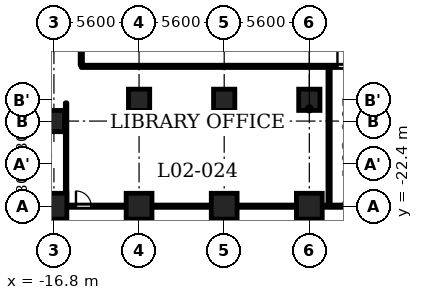
"""IFC4 building model, lengths in metres.
Left out: names, types, materials, properties, quantities, classifications, styles, units other than length and angle.
Written with IfcOpenShell. Run it as: python <this file> out.ifc"""

import sys

from ifc_helpers import new_model, si_unit, direction, frame, frame_2d, origin, origin_2d, place, context, subcontext, project, spatial, rectangle, extrude, element, fill, save


model = new_model("IFC4")
c1 = context("Model", 3, precision=1e-05, world=origin(), true_north=direction((0.0, 1.0)))
c2 = subcontext(c1, "Body", "Model", "MODEL_VIEW")
j1 = project(units=[si_unit("LENGTHUNIT", "METRE"), si_unit("PLANEANGLEUNIT", "RADIAN")], contexts=[c1])
p1 = place(None, origin())
s1 = spatial("IfcSite", under=j1, at=p1, CompositionType="ELEMENT")
p2 = place(p1, origin())
s2 = spatial("IfcBuilding", under=s1, at=p2, CompositionType="ELEMENT")
p3 = place(p2, frame((0.0, 0.0, 11.3)))
s3 = spatial("IfcBuildingStorey", under=s2, at=p3, CompositionType="ELEMENT", Elevation=11.3)
for number, where, z_axis, x_axis in (
    (1, (-16.8, -22.4, 0.0), (0.0, 0.0, 1.0), (1.0, 0.0, 0.0)),
    (2, (-11.2, -22.4, 0.0), (0.0, 0.0, 1.0), (1.0, 0.0, 0.0)),
    (3, (-5.6, -22.4, 0.0), (0.0, 0.0, 1.0), (1.0, 0.0, 0.0)),
    (4, (0.0, -22.4, 0.0), (0.0, 0.0, 1.0), (1.0, 0.0, 0.0)),
):
    element("IfcColumn", number, at=place(p3, frame(where, z_axis=z_axis, x_axis=x_axis)), inside=s3, PredefinedType="COLUMN", context=c2, shape_type="SweptSolid", body=[
        extrude(rectangle(XDim=1.7, YDim=1.7, at=origin_2d()), origin(), (0.0, 0.0, 1.0), 4.8),
    ])
for number, where, z_axis, x_axis in (
    (5, (-16.8, -16.8, 0.0), (0.0, 0.0, 1.0), (1.0, 0.0, 0.0)),
    (6, (-11.2, -15.4, 0.0), (0.0, 0.0, 1.0), (1.0, 0.0, 0.0)),
    (7, (-5.6, -15.4, 0.0), (0.0, 0.0, 1.0), (1.0, 0.0, 0.0)),
    (8, (0.0, -15.4, 0.0), (0.0, 0.0, 1.0), (1.0, 0.0, 0.0)),
):
    element("IfcColumn", number, at=place(p3, frame(where, z_axis=z_axis, x_axis=x_axis)), inside=s3, PredefinedType="COLUMN", context=c2, shape_type="SweptSolid", body=[
        extrude(rectangle(XDim=1.4, YDim=1.4, at=origin_2d()), origin(), (0.0, 0.0, 1.0), 4.8),
    ])
p4 = place(p3, frame((-18.98, -22.4, 0.0), z_axis=(0.0, 0.0, 1.0), x_axis=(1.0, 0.0, 0.0)))
e9 = element("IfcWall", 9, at=p4, inside=s3, PredefinedType="PARTITIONING", context=c2, shape_type="SweptSolid", body=[
    extrude(rectangle(XDim=38.211, YDim=0.15, at=frame_2d((19.105, 0.0))), origin(), (0.0, 0.0, 1.0), 3.55),
])
p5 = place(p4, frame((21.18, 0.0, 0.0)))
e10 = element("IfcOpeningElement", 10, at=p5, cuts=e9, PredefinedType="OPENING", context=c2, shape_type="SweptSolid", body=[
    extrude(rectangle(XDim=1.2, YDim=2.1, at=frame_2d((0.6, 1.05))), frame((0.0, 0.085, 0.0), z_axis=(0.0, -1.0, 0.0), x_axis=(1.0, 0.0, 0.0)), (0.0, 0.0, 1.0), 0.17),
])
p6 = place(p4, frame((0.08, 0.0, 0.0)))
e11 = element("IfcOpeningElement", 11, at=p6, cuts=e9, PredefinedType="OPENING", context=c2, shape_type="SweptSolid", body=[
    extrude(rectangle(XDim=1.0, YDim=2.1, at=frame_2d((0.5, 1.05))), frame((0.0, 0.085, 0.0), z_axis=(0.0, -1.0, 0.0), x_axis=(1.0, 0.0, 0.0)), (0.0, 0.0, 1.0), 0.17),
])
p7 = place(p4, frame((3.63, 0.0, 0.0)))
e12 = element("IfcOpeningElement", 12, at=p7, cuts=e9, PredefinedType="OPENING", context=c2, shape_type="SweptSolid", body=[
    extrude(rectangle(XDim=1.0, YDim=2.1, at=frame_2d((0.5, 1.05))), frame((0.0, 0.085, 0.0), z_axis=(0.0, -1.0, 0.0), x_axis=(1.0, 0.0, 0.0)), (0.0, 0.0, 1.0), 0.17),
])
p8 = place(p4, frame((27.93, 0.0, 0.0)))
e13 = element("IfcOpeningElement", 13, at=p8, cuts=e9, PredefinedType="OPENING", context=c2, shape_type="SweptSolid", body=[
    extrude(rectangle(XDim=0.9, YDim=2.1, at=frame_2d((0.45, 1.05))), frame((0.0, 0.085, 0.0), z_axis=(0.0, -1.0, 0.0), x_axis=(1.0, 0.0, 0.0)), (0.0, 0.0, 1.0), 0.17),
])
p9 = place(p4, frame((31.18, 0.0, 0.0)))
e14 = element("IfcOpeningElement", 14, at=p9, cuts=e9, PredefinedType="OPENING", context=c2, shape_type="SweptSolid", body=[
    extrude(rectangle(XDim=0.9, YDim=2.1, at=frame_2d((0.45, 1.05))), frame((0.0, 0.085, 0.0), z_axis=(0.0, -1.0, 0.0), x_axis=(1.0, 0.0, 0.0)), (0.0, 0.0, 1.0), 0.17),
])
p10 = place(p4, frame((33.88, 0.0, 0.0)))
e15 = element("IfcOpeningElement", 15, at=p10, cuts=e9, PredefinedType="OPENING", context=c2, shape_type="SweptSolid", body=[
    extrude(rectangle(XDim=0.9, YDim=2.1, at=frame_2d((0.45, 1.05))), frame((0.0, 0.085, 0.0), z_axis=(0.0, -1.0, 0.0), x_axis=(1.0, 0.0, 0.0)), (0.0, 0.0, 1.0), 0.17),
])
p11 = place(p4, frame((37.231, 0.0, 0.0)))
e16 = element("IfcOpeningElement", 16, at=p11, cuts=e9, PredefinedType="OPENING", context=c2, shape_type="SweptSolid", body=[
    extrude(rectangle(XDim=0.9, YDim=2.1, at=frame_2d((0.45, 1.05))), frame((0.0, 0.085, 0.0), z_axis=(0.0, -1.0, 0.0), x_axis=(1.0, 0.0, 0.0)), (0.0, 0.0, 1.0), 0.17),
])
p12 = place(p3, frame((-15.005, -13.2, 0.0), z_axis=(0.0, 0.0, 1.0), x_axis=(1.0, 0.0, 0.0)))
e17 = element("IfcWall", 17, at=p12, inside=s3, PredefinedType="PARTITIONING", context=c2, shape_type="SweptSolid", body=[
    extrude(rectangle(XDim=30.01, YDim=0.15, at=frame_2d((15.005, 0.0))), origin(), (0.0, 0.0, 1.0), 4.45),
])
p13 = place(p12, frame((16.855, 0.0, 0.0)))
e18 = element("IfcOpeningElement", 18, at=p13, cuts=e17, PredefinedType="OPENING", context=c2, shape_type="SweptSolid", body=[
    extrude(rectangle(XDim=1.8, YDim=2.1, at=frame_2d((0.9, 1.05))), frame((0.0, 0.085, 0.0), z_axis=(0.0, -1.0, 0.0), x_axis=(1.0, 0.0, 0.0)), (0.0, 0.0, 1.0), 0.17),
])
p14 = place(p3, frame((-16.0, -22.325, 0.0), z_axis=(0.0, 0.0, 1.0), x_axis=(0.0, 1.0, 0.0)))
e19 = element("IfcWall", 19, at=p14, inside=s3, PredefinedType="PARTITIONING", context=c2, shape_type="SweptSolid", body=[
    extrude(rectangle(XDim=6.725, YDim=0.1, at=frame_2d((3.362, 0.0))), origin(), (0.0, 0.0, 1.0), 4.45),
])
p15 = place(p3, frame((-15.0, -13.125, 0.0), z_axis=(0.0, 0.0, 1.0), x_axis=(0.0, 1.0, 0.0)))
e20 = element("IfcWall", 20, at=p15, inside=s3, PredefinedType="PARTITIONING", context=c2, shape_type="SweptSolid", body=[
    extrude(rectangle(XDim=6.356, YDim=0.15, at=frame_2d((3.178, 0.0))), origin(), (0.0, 0.0, 1.0), 4.45),
])
p16 = place(p3, frame((1.3, -22.325, 0.0), z_axis=(0.0, 0.0, 1.0), x_axis=(0.0, 1.0, 0.0)))
e21 = element("IfcWall", 21, at=p16, inside=s3, PredefinedType="PARTITIONING", context=c2, shape_type="SweptSolid", body=[
    extrude(rectangle(XDim=9.05, YDim=0.15, at=frame_2d((4.525, 0.0))), origin(), (0.0, 0.0, 1.0), 4.45),
])
p17 = place(p13, origin())
e22 = element("IfcDoor", 22, at=p17, inside=s3, OperationType="SINGLE_SWING_RIGHT", PredefinedType="DOOR", context=c2, shape_type="SweptSolid", body=[
    extrude(rectangle(XDim=1.8, YDim=2.1, at=frame_2d((0.9, 1.05))), frame((0.0, 0.025, 0.0), z_axis=(0.0, -1.0, 0.0), x_axis=(1.0, 0.0, 0.0)), (0.0, 0.0, 1.0), 0.05),
])
fill(e18, e22)
p18 = place(p5, origin())
e23 = element("IfcDoor", 23, at=p18, inside=s3, OperationType="SINGLE_SWING_LEFT", PredefinedType="DOOR", context=c2, shape_type="SweptSolid", body=[
    extrude(rectangle(XDim=1.2, YDim=2.1, at=frame_2d((0.6, 1.05))), frame((0.0, 0.025, 0.0), z_axis=(0.0, -1.0, 0.0), x_axis=(1.0, 0.0, 0.0)), (0.0, 0.0, 1.0), 0.05),
])
fill(e10, e23)
p19 = place(p7, origin())
e24 = element("IfcDoor", 24, at=p19, inside=s3, OperationType="SINGLE_SWING_RIGHT", PredefinedType="DOOR", context=c2, shape_type="SweptSolid", body=[
    extrude(rectangle(XDim=1.0, YDim=2.1, at=frame_2d((0.5, 1.05))), frame((0.0, 0.025, 0.0), z_axis=(0.0, -1.0, 0.0), x_axis=(1.0, 0.0, 0.0)), (0.0, 0.0, 1.0), 0.05),
])
fill(e12, e24)
save(model, sys.argv[1])
